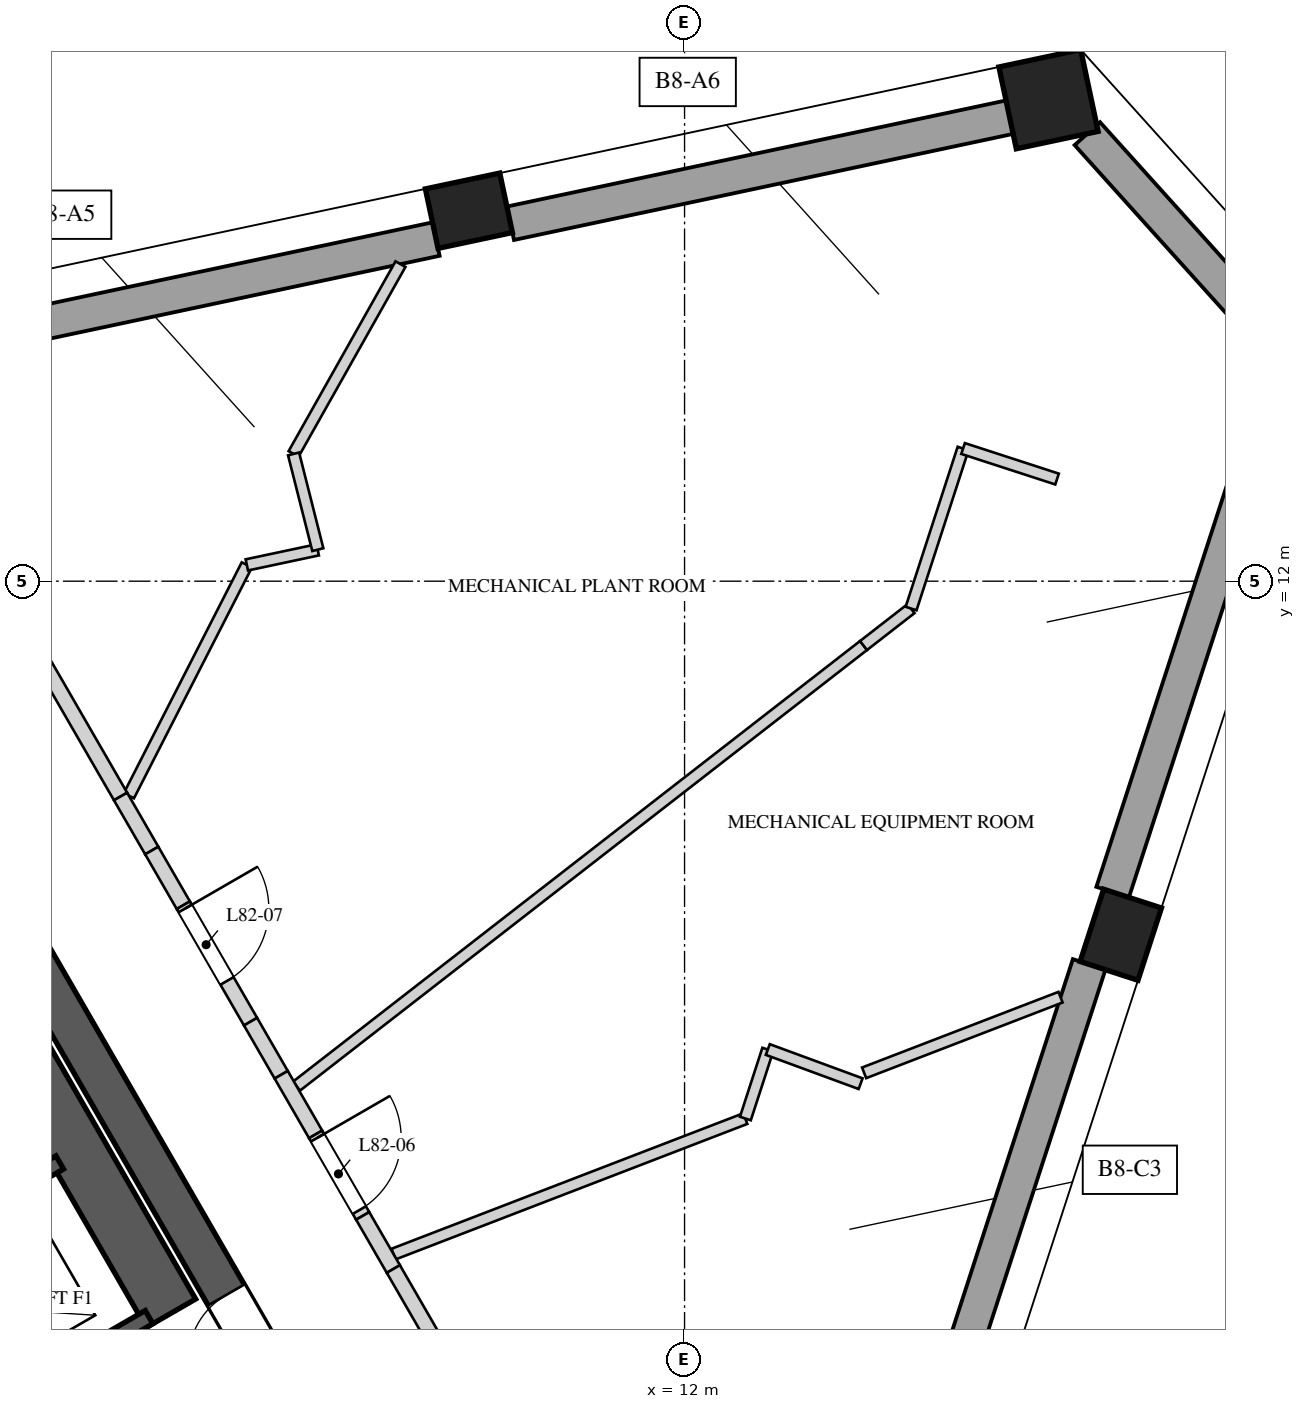
"""IFC4 building model, lengths in metres.
Left out: names, types, materials, properties, quantities, classifications, styles, units other than length and angle.
Written with IfcOpenShell. Run it as: python <this file> out.ifc"""

import sys

from ifc_helpers import new_model, si_unit, direction, frame, frame_2d, origin, origin_2d, place, context, subcontext, project, spatial, polyline, rectangle, outline, extrude, element, fill, save


model = new_model("IFC4")
c1 = context("Model", 3, precision=1e-05, world=origin(), true_north=direction((0.0, 1.0)))
c2 = subcontext(c1, "Body", "Model", "MODEL_VIEW")
j1 = project(units=[si_unit("LENGTHUNIT", "METRE"), si_unit("PLANEANGLEUNIT", "RADIAN")], contexts=[c1])
p1 = place(None, origin())
s1 = spatial("IfcSite", under=j1, at=p1, CompositionType="ELEMENT")
p2 = place(p1, origin())
s2 = spatial("IfcBuilding", under=s1, at=p2, CompositionType="ELEMENT")
p3 = place(p2, frame((0.0, 0.0, 356.9)))
s3 = spatial("IfcBuildingStorey", under=s2, at=p3, CompositionType="ELEMENT", Elevation=356.9)
p4 = place(p3, frame((9.93, -4.25, 0.0), z_axis=(0.0, 0.0, 1.0), x_axis=(-0.499994590896, 0.86602852671, 0.0)))
e1 = element("IfcWall", 1, at=p4, inside=s3, PredefinedType="SHEAR", context=c2, shape_type="SweptSolid", body=[
    extrude(rectangle(XDim=17.292, YDim=0.55, at=frame_2d((8.646, 0.0))), origin(), (0.0, 0.0, 1.0), 4.5),
])
p5 = place(p4, frame((6.921, 0.0, 0.0)))
e2 = element("IfcOpeningElement", 2, at=p5, cuts=e1, PredefinedType="OPENING", context=c2, shape_type="SweptSolid", body=[
    extrude(rectangle(XDim=1.0, YDim=2.4, at=frame_2d((0.5, 1.2))), frame((0.0, 0.285, 0.0), z_axis=(0.0, -1.0, 0.0), x_axis=(1.0, 0.0, 0.0)), (0.0, 0.0, 1.0), 0.57),
])
p6 = place(p3, frame((17.739, 7.349, 0.0), z_axis=(0.0, 0.0, 1.0), x_axis=(0.309016994375, 0.951056516295, 0.0)))
e3 = element("IfcColumn", 3, at=p6, inside=s3, PredefinedType="COLUMN", context=c2, shape_type="SweptSolid", body=[
    extrude(rectangle(XDim=1.0, YDim=0.8, at=origin_2d()), origin(), (0.0, 0.0, 1.0), 4.5),
])
p7 = place(p3, frame((16.788, 18.341, 0.0), z_axis=(0.0, 0.0, 1.0), x_axis=(-0.978147600734, -0.207911690818, 0.0)))
e4 = element("IfcColumn", 4, at=p7, inside=s3, PredefinedType="COLUMN", context=c2, shape_type="SweptSolid", body=[
    extrude(rectangle(XDim=1.1, YDim=1.1, at=origin_2d()), origin(), (0.0, 0.0, 1.0), 4.5),
])
p8 = place(p3, frame((9.163, 16.874, 0.0), z_axis=(0.0, 0.0, 1.0), x_axis=(-0.978147600734, -0.207911690818, 0.0)))
e5 = element("IfcColumn", 5, at=p8, inside=s3, PredefinedType="COLUMN", context=c2, shape_type="SweptSolid", body=[
    extrude(rectangle(XDim=1.0, YDim=0.8, at=origin_2d()), origin(), (0.0, 0.0, 1.0), 4.5),
])
p9 = place(p3, frame((15.063, 0.002, 0.0), z_axis=(0.0, 0.0, 1.0), x_axis=(0.309008326872, 0.951059332494, 0.0)))
e6 = element("IfcWall", 6, at=p9, inside=s3, PredefinedType="SOLIDWALL", context=c2, shape_type="SweptSolid", body=[
    extrude(rectangle(XDim=7.314, YDim=0.45, at=frame_2d((3.657, 0.0))), origin(), (0.0, 0.0, 1.0), 3.8),
])
p10 = place(p3, frame((17.632, 7.909, 0.0), z_axis=(0.0, 0.0, 1.0), x_axis=(0.309018647645, 0.951055979114, 0.0)))
e7 = element("IfcWall", 7, at=p10, inside=s3, PredefinedType="SOLIDWALL", context=c2, shape_type="SweptSolid", body=[
    extrude(rectangle(XDim=6.714, YDim=0.45, at=frame_2d((3.357, 0.0))), origin(), (0.0, 0.0, 1.0), 3.8),
])
p11 = place(p3, frame((19.598, 15.335, 0.0), z_axis=(0.0, 0.0, 1.0), x_axis=(-0.669109997009, 0.743163381702, 0.0)))
e8 = element("IfcWall", 8, at=p11, inside=s3, PredefinedType="SOLIDWALL", context=c2, shape_type="SweptSolid", body=[
    extrude(rectangle(XDim=3.435, YDim=0.45, at=frame_2d((1.718, 0.0))), origin(), (0.0, 0.0, 1.0), 3.8),
])
p12 = place(p3, frame((8.731, 16.501, 0.0), z_axis=(0.0, 0.0, 1.0), x_axis=(-0.978151299843, -0.207894287118, 0.0)))
e9 = element("IfcWall", 9, at=p12, inside=s3, PredefinedType="SOLIDWALL", context=c2, shape_type="SweptSolid", body=[
    extrude(rectangle(XDim=7.314, YDim=0.45, at=frame_2d((3.657, 0.0))), origin(), (0.0, 0.0, 1.0), 3.8),
])
p13 = place(p3, frame((16.276, 18.105, 0.0), z_axis=(0.0, 0.0, 1.0), x_axis=(-0.978144338977, -0.207927035587, 0.0)))
e10 = element("IfcWall", 10, at=p13, inside=s3, PredefinedType="SOLIDWALL", context=c2, shape_type="SweptSolid", body=[
    extrude(rectangle(XDim=6.714, YDim=0.45, at=frame_2d((3.357, 0.0))), origin(), (0.0, 0.0, 1.0), 3.8),
])
p14 = place(p3, frame((5.243, 2.369, 0.0), z_axis=(0.0, 0.0, 1.0), x_axis=(-0.500002801628, 0.866023786258, 0.0)))
e11 = element("IfcWall", 11, at=p14, inside=s3, PredefinedType="SOLIDWALL", context=c2, shape_type="SweptSolid", body=[
    extrude(rectangle(XDim=4.9, YDim=0.75, at=frame_2d((2.45, 0.0))), origin(), (0.0, 0.0, 1.0), 4.15),
])
for number, where, z_axis, x_axis in (
    (12, (2.227, 0.743, 0.0), (0.0, 0.0, 1.0), (0.866, 0.5, 0.0)),
    (13, (1.052, 2.778, 0.0), (0.0, 0.0, 1.0), (0.866, 0.5, 0.0)),
):
    element("IfcWall", number, at=place(p3, frame(where, z_axis=z_axis, x_axis=x_axis)), inside=s3, PredefinedType="SOLIDWALL", context=c2, shape_type="SweptSolid", body=[
        extrude(rectangle(XDim=3.15, YDim=0.2, at=frame_2d((1.575, 0.0))), origin(), (0.0, 0.0, 1.0), 4.15),
    ])
p15 = place(p3, frame((4.689, 9.178, 0.0), z_axis=(0.0, 0.0, 1.0), x_axis=(0.454986170549, 0.890498503429, 0.0)))
e14 = element("IfcWall", 14, at=p15, inside=s3, PredefinedType="PARTITIONING", context=c2, shape_type="SweptSolid", body=[
    extrude(rectangle(XDim=3.41, YDim=0.15, at=frame_2d((1.705, 0.0))), origin(), (0.0, 0.0, 1.0), 3.45),
])
p16 = place(p3, frame((6.241, 12.214, 0.0), z_axis=(0.0, 0.0, 1.0), x_axis=(0.978156899052, 0.207867940861, 0.0)))
e15 = element("IfcWall", 15, at=p16, inside=s3, PredefinedType="PARTITIONING", context=c2, shape_type="SweptSolid", body=[
    extrude(rectangle(XDim=0.954, YDim=0.15, at=frame_2d((0.477, 0.0))), origin(), (0.0, 0.0, 1.0), 3.45),
])
p17 = place(p3, frame((6.856, 13.674, 0.0), z_axis=(0.0, 0.0, 1.0), x_axis=(0.490827341064, 0.871256862965, 0.0)))
e16 = element("IfcWall", 16, at=p17, inside=s3, PredefinedType="PARTITIONING", context=c2, shape_type="SweptSolid", body=[
    extrude(rectangle(XDim=2.866, YDim=0.15, at=frame_2d((1.433, 0.0))), origin(), (0.0, 0.0, 1.0), 4.15),
])
p18 = place(p3, frame((6.895, 5.357, 0.0), z_axis=(0.0, 0.0, 1.0), x_axis=(0.789642975189, 0.613566599266, 0.0)))
e17 = element("IfcWall", 17, at=p18, inside=s3, PredefinedType="PARTITIONING", context=c2, shape_type="SweptSolid", body=[
    extrude(rectangle(XDim=9.447, YDim=0.15, at=frame_2d((4.723, 0.0))), origin(), (0.0, 0.0, 1.0), 3.05),
])
p19 = place(p3, frame((14.354, 11.154, 0.0), z_axis=(0.0, 0.0, 1.0), x_axis=(0.789667695436, 0.61353478368, 0.0)))
e18 = element("IfcWall", 18, at=p19, inside=s3, PredefinedType="PARTITIONING", context=c2, shape_type="SweptSolid", body=[
    extrude(rectangle(XDim=0.792, YDim=0.15, at=frame_2d((0.396, 0.0))), origin(), (0.0, 0.0, 1.0), 4.15),
])
p20 = place(p3, frame((7.175, 12.415, 0.0), z_axis=(0.0, 0.0, 1.0), x_axis=(-0.245629774487, 0.969363715994, 0.0)))
e19 = element("IfcWall", 19, at=p20, inside=s3, PredefinedType="PARTITIONING", context=c2, shape_type="SweptSolid", body=[
    extrude(rectangle(XDim=1.299, YDim=0.15, at=frame_2d((0.649, 0.0))), origin(), (0.0, 0.0, 1.0), 3.45),
])
p21 = place(p3, frame((8.171, 3.147, 0.0), z_axis=(0.0, 0.0, 1.0), x_axis=(0.933160243697, 0.359460650953, 0.0)))
e20 = element("IfcWall", 20, at=p21, inside=s3, PredefinedType="PARTITIONING", context=c2, shape_type="SweptSolid", body=[
    extrude(rectangle(XDim=4.959, YDim=0.15, at=frame_2d((2.48, 0.0))), origin(), (0.0, 0.0, 1.0), 3.25),
])
p22 = place(p3, frame((12.8, 4.931, 0.0), z_axis=(0.0, 0.0, 1.0), x_axis=(0.30908028689, 0.951035948982, 0.0)))
e21 = element("IfcWall", 21, at=p22, inside=s3, PredefinedType="PARTITIONING", context=c2, shape_type="SweptSolid", body=[
    extrude(rectangle(XDim=0.954, YDim=0.15, at=frame_2d((0.477, 0.0))), origin(), (0.0, 0.0, 1.0), 3.25),
])
p23 = place(p3, frame((13.095, 5.839, 0.0), z_axis=(0.0, 0.0, 1.0), x_axis=(0.938493614459, -0.345296590803, 0.0)))
e22 = element("IfcWall", 22, at=p23, inside=s3, PredefinedType="PARTITIONING", context=c2, shape_type="SweptSolid", body=[
    extrude(rectangle(XDim=1.301, YDim=0.15, at=frame_2d((0.65, 0.0))), origin(), (0.0, 0.0, 1.0), 3.25),
])
p24 = place(p3, frame((14.363, 5.532, 0.0), z_axis=(0.0, 0.0, 1.0), x_axis=(0.933150029703, 0.359487165369, 0.0)))
e23 = element("IfcWall", 23, at=p24, inside=s3, PredefinedType="PARTITIONING", context=c2, shape_type="SweptSolid", body=[
    extrude(rectangle(XDim=2.769, YDim=0.15, at=frame_2d((1.384, 0.0))), origin(), (0.0, 0.0, 1.0), 4.15),
])
p25 = place(p3, frame((14.98, 11.64, 0.0), z_axis=(0.0, 0.0, 1.0), x_axis=(0.309006275216, 0.951059999094, 0.0)))
e24 = element("IfcWall", 24, at=p25, inside=s3, PredefinedType="PARTITIONING", context=c2, shape_type="SweptSolid", body=[
    extrude(rectangle(XDim=2.214, YDim=0.15, at=frame_2d((1.107, 0.0))), origin(), (0.0, 0.0, 1.0), 4.15),
])
p26 = place(p3, frame((15.664, 13.746, 0.0), z_axis=(0.0, 0.0, 1.0), x_axis=(0.951023027266, -0.309120044013, 0.0)))
e25 = element("IfcWall", 25, at=p26, inside=s3, PredefinedType="PARTITIONING", context=c2, shape_type="SweptSolid", body=[
    extrude(rectangle(XDim=1.3, YDim=0.15, at=frame_2d((0.65, 0.0))), origin(), (0.0, 0.0, 1.0), 4.15),
])
p27 = place(p3, frame((2.483, 12.8, 0.0), z_axis=(0.0, 0.0, 1.0), x_axis=(0.499982771656, -0.866035350345, 0.0)))
e26 = element("IfcWall", 26, at=p27, inside=s3, PredefinedType="SOLIDWALL", context=c2, shape_type="SweptSolid", body=[
    extrude(rectangle(XDim=4.195, YDim=0.2, at=frame_2d((2.097, 0.0))), origin(), (0.0, 0.0, 1.0), 4.15),
])
p28 = place(p3, frame((4.58, 9.167, 0.0), z_axis=(0.0, 0.0, 1.0), x_axis=(0.499945576647, -0.866056822842, 0.0)))
e27 = element("IfcWall", 27, at=p28, inside=s3, PredefinedType="SOLIDWALL", context=c2, shape_type="SweptSolid", body=[
    extrude(rectangle(XDim=0.821, YDim=0.2, at=frame_2d((0.41, 0.0))), origin(), (0.0, 0.0, 1.0), 3.45),
])
p29 = place(p3, frame((4.99, 8.457, 0.0), z_axis=(0.0, 0.0, 1.0), x_axis=(0.500027802648, -0.866009351323, 0.0)))
e28 = element("IfcWall", 28, at=p29, inside=s3, PredefinedType="SOLIDWALL", context=c2, shape_type="SweptSolid", body=[
    extrude(rectangle(XDim=0.831, YDim=0.2, at=frame_2d((0.415, 0.0))), origin(), (0.0, 0.0, 1.0), 4.15),
])
p30 = place(p3, frame((5.406, 7.737, 0.0), z_axis=(0.0, 0.0, 1.0), x_axis=(0.500013151769, -0.866017810474, 0.0)))
e29 = element("IfcWall", 29, at=p30, inside=s3, PredefinedType="SOLIDWALL", context=c2, shape_type="SweptSolid", body=[
    extrude(outline(polyline([(0.0, 0.0), (1.769, 0.0), (1.769, 3.05), (0.825, 3.05), (0.825, 4.15), (0.0, 4.15), (0.0, 0.0)])), frame((0.0, 0.1, 0.0), z_axis=(0.0, -1.0, 0.0), x_axis=(1.0, 0.0, 0.0)), (0.0, 0.0, 1.0), 0.2),
])
p31 = place(p30, frame((0.05, 0.0, 0.0)))
e30 = element("IfcOpeningElement", 30, at=p31, cuts=e29, PredefinedType="OPENING", context=c2, shape_type="SweptSolid", body=[
    extrude(rectangle(XDim=1.1, YDim=2.4, at=frame_2d((0.55, 1.2))), frame((0.0, 0.11, 0.0), z_axis=(0.0, -1.0, 0.0), x_axis=(1.0, 0.0, 0.0)), (0.0, 0.0, 1.0), 0.22),
])
p32 = place(p3, frame((6.29, 6.205, 0.0), z_axis=(0.0, 0.0, 1.0), x_axis=(0.500045602705, -0.86599907345, 0.0)))
e31 = element("IfcWall", 31, at=p32, inside=s3, PredefinedType="SOLIDWALL", context=c2, shape_type="SweptSolid", body=[
    extrude(rectangle(XDim=0.807, YDim=0.2, at=frame_2d((0.403, 0.0))), origin(), (0.0, 0.0, 1.0), 4.15),
])
p33 = place(p3, frame((6.693, 5.507, 0.0), z_axis=(0.0, 0.0, 1.0), x_axis=(0.499994660107, -0.866028486751, 0.0)))
e32 = element("IfcWall", 32, at=p33, inside=s3, PredefinedType="SOLIDWALL", context=c2, shape_type="SweptSolid", body=[
    extrude(rectangle(XDim=0.906, YDim=0.2, at=frame_2d((0.453, 0.0))), origin(), (0.0, 0.0, 1.0), 3.05),
])
p34 = place(p3, frame((7.146, 4.722, 0.0), z_axis=(0.0, 0.0, 1.0), x_axis=(0.499955681623, -0.866050989499, 0.0)))
e33 = element("IfcWall", 33, at=p34, inside=s3, PredefinedType="SOLIDWALL", context=c2, shape_type="SweptSolid", body=[
    extrude(rectangle(XDim=1.238, YDim=0.2, at=frame_2d((0.619, 0.0))), origin(), (0.0, 0.0, 1.0), 4.15),
])
p35 = place(p34, frame((0.05, 0.0, 0.0)))
e34 = element("IfcOpeningElement", 34, at=p35, cuts=e33, PredefinedType="OPENING", context=c2, shape_type="SweptSolid", body=[
    extrude(rectangle(XDim=1.1, YDim=2.4, at=frame_2d((0.55, 1.2))), frame((0.0, 0.11, 0.0), z_axis=(0.0, -1.0, 0.0), x_axis=(1.0, 0.0, 0.0)), (0.0, 0.0, 1.0), 0.22),
])
p36 = place(p3, frame((7.765, 3.65, 0.0), z_axis=(0.0, 0.0, 1.0), x_axis=(0.500141487433, -0.865943700565, 0.0)))
e35 = element("IfcWall", 35, at=p36, inside=s3, PredefinedType="SOLIDWALL", context=c2, shape_type="SweptSolid", body=[
    extrude(rectangle(XDim=0.807, YDim=0.2, at=frame_2d((0.403, 0.0))), origin(), (0.0, 0.0, 1.0), 3.25),
])
p37 = place(p3, frame((8.169, 2.951, 0.0), z_axis=(0.0, 0.0, 1.0), x_axis=(0.499955030392, -0.866051365443, 0.0)))
e36 = element("IfcWall", 36, at=p37, inside=s3, PredefinedType="SOLIDWALL", context=c2, shape_type="SweptSolid", body=[
    extrude(rectangle(XDim=3.392, YDim=0.2, at=frame_2d((1.696, 0.0))), origin(), (0.0, 0.0, 1.0), 4.15),
])
p38 = place(p5, origin())
e37 = element("IfcDoor", 37, at=p38, inside=s3, OperationType="SINGLE_SWING_RIGHT", PredefinedType="DOOR", context=c2, shape_type="SweptSolid", body=[
    extrude(rectangle(XDim=1.0, YDim=2.4, at=frame_2d((0.5, 1.2))), frame((0.0, 0.025, 0.0), z_axis=(0.0, -1.0, 0.0), x_axis=(1.0, 0.0, 0.0)), (0.0, 0.0, 1.0), 0.05),
])
fill(e2, e37)
p39 = place(p35, origin())
e38 = element("IfcDoor", 38, at=p39, inside=s3, OperationType="SINGLE_SWING_RIGHT", PredefinedType="DOOR", context=c2, shape_type="SweptSolid", body=[
    extrude(rectangle(XDim=1.1, YDim=2.4, at=frame_2d((0.55, 1.2))), frame((0.0, 0.025, 0.0), z_axis=(0.0, -1.0, 0.0), x_axis=(1.0, 0.0, 0.0)), (0.0, 0.0, 1.0), 0.05),
])
fill(e34, e38)
p40 = place(p31, origin())
e39 = element("IfcDoor", 39, at=p40, inside=s3, OperationType="SINGLE_SWING_LEFT", PredefinedType="DOOR", context=c2, shape_type="SweptSolid", body=[
    extrude(rectangle(XDim=1.1, YDim=2.4, at=frame_2d((0.55, 1.2))), frame((0.0, 0.025, 0.0), z_axis=(0.0, -1.0, 0.0), x_axis=(1.0, 0.0, 0.0)), (0.0, 0.0, 1.0), 0.05),
])
fill(e30, e39)
save(model, sys.argv[1])
